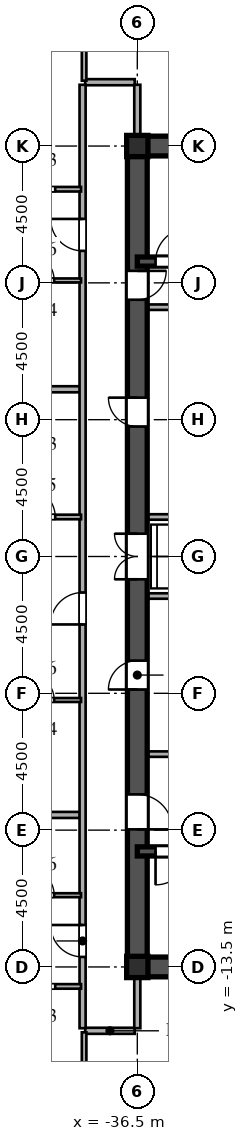
"""IFC4 building model, lengths in metres.
Left out: names, types, materials, properties, quantities, classifications, styles, units other than length and angle.
Written with IfcOpenShell. Run it as: python <this file> out.ifc"""

import sys

from ifc_helpers import new_model, si_unit, direction, frame, frame_2d, origin, origin_2d, place, context, subcontext, project, spatial, rectangle, i_section, extrude, source, transform, mapped, element, fill, save


model = new_model("IFC4")
c1 = context("Model", 3, precision=1e-05, world=origin(), true_north=direction((0.0, 1.0)))
c2 = subcontext(c1, "Body", "Model", "MODEL_VIEW")
j1 = project(units=[si_unit("LENGTHUNIT", "METRE"), si_unit("PLANEANGLEUNIT", "RADIAN")], contexts=[c1])
p1 = place(None, origin())
s1 = spatial("IfcSite", under=j1, at=p1, CompositionType="ELEMENT")
p2 = place(p1, origin())
s2 = spatial("IfcBuilding", under=s1, at=p2, CompositionType="ELEMENT")
p3 = place(p2, frame((0.0, 0.0, 110.4)))
s3 = spatial("IfcBuildingStorey", under=s2, at=p3, CompositionType="ELEMENT", Elevation=110.4)
m1 = source(origin(), c2, "Body", "SweptSolid", [
    extrude(i_section(OverallWidth=0.7, OverallDepth=0.7, WebThickness=0.028, FlangeThickness=0.045, at=origin_2d()), origin(), (0.0, 0.0, 1.0), 3.6),
])
for number, where, z_axis, x_axis in (
    (1, (-36.5, -13.5, 0.0), (0.0, 0.0, 1.0), (1.0, 0.0, 0.0)),
    (2, (-36.5, 13.5, 0.0), (0.0, 0.0, 1.0), (1.0, 0.0, 0.0)),
):
    element("IfcColumn", number, at=place(p3, frame(where, z_axis=z_axis, x_axis=x_axis)), inside=s3, PredefinedType="COLUMN", context=c2, shape_type="MappedRepresentation", body=[
        mapped(m1, transform((0.0, 0.0, 0.0), scale=1.0)),
    ])
for number, where, z_axis, x_axis in (
    (3, (-36.5, -13.5, 0.0), (0.0, 0.0, 1.0), (1.0, 0.0, 0.0)),
    (4, (-36.5, 13.5, 0.0), (0.0, 0.0, 1.0), (1.0, 0.0, 0.0)),
):
    element("IfcWall", number, at=place(p3, frame(where, z_axis=z_axis, x_axis=x_axis)), inside=s3, PredefinedType="SHEAR", context=c2, shape_type="SweptSolid", body=[
        extrude(rectangle(XDim=9.0, YDim=0.65, at=frame_2d((4.5, 0.0))), origin(), (0.0, 0.0, 1.0), 3.38),
    ])
p4 = place(p3, frame((-36.5, -13.65, 0.0), z_axis=(0.0, 0.0, 1.0), x_axis=(0.0, 1.0, 0.0)))
e5 = element("IfcWall", 5, at=p4, inside=s3, PredefinedType="SHEAR", context=c2, shape_type="SweptSolid", body=[
    extrude(rectangle(XDim=7.15, YDim=0.65, at=frame_2d((3.575, 0.0))), origin(), (0.0, 0.0, 1.0), 3.38),
])
p5 = place(p4, frame((4.675, 0.0, 0.0)))
e6 = element("IfcOpeningElement", 6, at=p5, cuts=e5, PredefinedType="OPENING", context=c2, shape_type="SweptSolid", body=[
    extrude(rectangle(XDim=1.15, YDim=2.2, at=frame_2d((0.575, 1.1))), frame((0.0, 0.335, 0.0), z_axis=(0.0, -1.0, 0.0), x_axis=(1.0, 0.0, 0.0)), (0.0, 0.0, 1.0), 0.67),
])
p6 = place(p3, frame((-36.5, -1.3, 0.0), z_axis=(0.0, 0.0, 1.0), x_axis=(0.0, 1.0, 0.0)))
e7 = element("IfcWall", 7, at=p6, inside=s3, PredefinedType="SHEAR", context=c2, shape_type="SweptSolid", body=[
    extrude(rectangle(XDim=2.6, YDim=0.65, at=frame_2d((1.3, 0.0))), origin(), (0.0, 0.0, 1.0), 3.38),
])
p7 = place(p6, frame((0.55, 0.0, 0.0)))
e8 = element("IfcOpeningElement", 8, at=p7, cuts=e7, PredefinedType="OPENING", context=c2, shape_type="SweptSolid", body=[
    extrude(rectangle(XDim=1.5, YDim=2.3, at=frame_2d((0.75, 1.15))), frame((0.0, 0.335, 0.0), z_axis=(0.0, -1.0, 0.0), x_axis=(1.0, 0.0, 0.0)), (0.0, 0.0, 1.0), 0.67),
])
p8 = place(p3, frame((-36.5, 8.2, 0.0), z_axis=(0.0, 0.0, 1.0), x_axis=(0.0, 1.0, 0.0)))
e9 = element("IfcWall", 9, at=p8, inside=s3, PredefinedType="SHEAR", context=c2, shape_type="SweptSolid", body=[
    extrude(rectangle(XDim=5.45, YDim=0.65, at=frame_2d((2.725, 0.0))), origin(), (0.0, 0.0, 1.0), 3.38),
])
p9 = place(p8, frame((0.245, 0.0, 0.0)))
e10 = element("IfcOpeningElement", 10, at=p9, cuts=e9, PredefinedType="OPENING", context=c2, shape_type="SweptSolid", body=[
    extrude(rectangle(XDim=0.95, YDim=2.15, at=frame_2d((0.475, 1.075))), frame((0.0, 0.335, 0.0), z_axis=(0.0, -1.0, 0.0), x_axis=(1.0, 0.0, 0.0)), (0.0, 0.0, 1.0), 0.67),
])
p10 = place(p3, frame((-36.5, -6.5, 0.0), z_axis=(0.0, 0.0, 1.0), x_axis=(0.0, 1.0, 0.0)))
e11 = element("IfcWall", 11, at=p10, inside=s3, PredefinedType="SHEAR", context=c2, shape_type="SweptSolid", body=[
    extrude(rectangle(XDim=5.2, YDim=0.65, at=frame_2d((2.6, 0.0))), origin(), (0.0, 0.0, 1.0), 3.38),
])
p11 = place(p10, frame((2.125, 0.0, 0.0)))
e12 = element("IfcOpeningElement", 12, at=p11, cuts=e11, PredefinedType="OPENING", context=c2, shape_type="SweptSolid", body=[
    extrude(rectangle(XDim=0.95, YDim=2.15, at=frame_2d((0.475, 1.075))), frame((0.0, 0.335, 0.0), z_axis=(0.0, -1.0, 0.0), x_axis=(1.0, 0.0, 0.0)), (0.0, 0.0, 1.0), 0.67),
])
p12 = place(p3, frame((-36.5, 1.3, 0.0), z_axis=(0.0, 0.0, 1.0), x_axis=(0.0, 1.0, 0.0)))
e13 = element("IfcWall", 13, at=p12, inside=s3, PredefinedType="SHEAR", context=c2, shape_type="SweptSolid", body=[
    extrude(rectangle(XDim=6.9, YDim=0.65, at=frame_2d((3.45, 0.0))), origin(), (0.0, 0.0, 1.0), 3.38),
])
p13 = place(p12, frame((2.975, 0.0, 0.0)))
e14 = element("IfcOpeningElement", 14, at=p13, cuts=e13, PredefinedType="OPENING", context=c2, shape_type="SweptSolid", body=[
    extrude(rectangle(XDim=0.95, YDim=2.15, at=frame_2d((0.475, 1.075))), frame((0.0, 0.335, 0.0), z_axis=(0.0, -1.0, 0.0), x_axis=(1.0, 0.0, 0.0)), (0.0, 0.0, 1.0), 0.67),
])
p14 = place(p3, frame((-36.5, -9.7, 0.0), z_axis=(0.0, 0.0, 1.0), x_axis=(1.0, 0.0, 0.0)))
e15 = element("IfcWall", 15, at=p14, inside=s3, PredefinedType="SHEAR", context=c2, shape_type="SweptSolid", body=[
    extrude(rectangle(XDim=9.0, YDim=0.3, at=frame_2d((4.5, 0.0))), origin(), (0.0, 0.0, 1.0), 3.38),
])
p15 = place(p14, frame((0.6, 0.0, 0.0)))
e16 = element("IfcOpeningElement", 16, at=p15, cuts=e15, PredefinedType="OPENING", context=c2, shape_type="SweptSolid", body=[
    extrude(rectangle(XDim=1.1, YDim=2.2, at=frame_2d((0.55, 1.1))), frame((0.0, 0.16, 0.0), z_axis=(0.0, -1.0, 0.0), x_axis=(1.0, 0.0, 0.0)), (0.0, 0.0, 1.0), 0.32),
])
p16 = place(p3, frame((-36.5, 9.7, 0.0), z_axis=(0.0, 0.0, 1.0), x_axis=(1.0, 0.0, 0.0)))
e17 = element("IfcWall", 17, at=p16, inside=s3, PredefinedType="SHEAR", context=c2, shape_type="SweptSolid", body=[
    extrude(rectangle(XDim=9.0, YDim=0.3, at=frame_2d((4.5, 0.0))), origin(), (0.0, 0.0, 1.0), 3.38),
])
p17 = place(p16, frame((0.6, 0.0, 0.0)))
e18 = element("IfcOpeningElement", 18, at=p17, cuts=e17, PredefinedType="OPENING", context=c2, shape_type="SweptSolid", body=[
    extrude(rectangle(XDim=1.1, YDim=2.2, at=frame_2d((0.55, 1.1))), frame((0.0, 0.16, 0.0), z_axis=(0.0, -1.0, 0.0), x_axis=(1.0, 0.0, 0.0)), (0.0, 0.0, 1.0), 0.32),
])
for number, where, z_axis, x_axis in (
    (19, (-36.15, -6.5, 0.0), (0.0, 0.0, 1.0), (1.0, 0.0, 0.0)),
    (20, (-36.15, 8.2, 0.0), (0.0, 0.0, 1.0), (1.0, 0.0, 0.0)),
):
    element("IfcWall", number, at=place(p3, frame(where, z_axis=z_axis, x_axis=x_axis)), inside=s3, PredefinedType="PARTITIONING", context=c2, shape_type="SweptSolid", body=[
        extrude(rectangle(XDim=5.7, YDim=0.18, at=frame_2d((2.85, 0.0))), origin(), (0.0, 0.0, 1.0), 3.38),
    ])
for number, where, z_axis, x_axis in (
    (21, (-36.15, -1.3, 0.0), (0.0, 0.0, 1.0), (1.0, 0.0, 0.0)),
    (22, (-36.15, 1.3, 0.0), (0.0, 0.0, 1.0), (1.0, 0.0, 0.0)),
):
    element("IfcWall", number, at=place(p3, frame(where, z_axis=z_axis, x_axis=x_axis)), inside=s3, PredefinedType="PARTITIONING", context=c2, shape_type="SweptSolid", body=[
        extrude(rectangle(XDim=2.95, YDim=0.18, at=frame_2d((1.475, 0.0))), origin(), (0.0, 0.0, 1.0), 3.38),
    ])
p18 = place(p3, frame((-38.215, -15.6, 0.0), z_axis=(0.0, 0.0, 1.0), x_axis=(1.0, 0.0, 0.0)))
e23 = element("IfcWall", 23, at=p18, inside=s3, PredefinedType="PARTITIONING", context=c2, shape_type="SweptSolid", body=[
    extrude(rectangle(XDim=1.63, YDim=0.2, at=frame_2d((0.815, 0.0))), origin(), (0.0, 0.0, 1.0), 3.38),
])
p19 = place(p3, frame((-41.0, -14.14, 0.0), z_axis=(0.0, 0.0, 1.0), x_axis=(1.0, 0.0, 0.0)))
e24 = element("IfcWall", 24, at=p19, inside=s3, PredefinedType="PARTITIONING", context=c2, shape_type="SweptSolid", body=[
    extrude(rectangle(XDim=2.65, YDim=0.15, at=frame_2d((1.325, 0.0))), origin(), (0.0, 0.0, 1.0), 3.38),
])
p20 = place(p19, frame((0.85, 0.0, 0.0)))
e25 = element("IfcOpeningElement", 25, at=p20, cuts=e24, PredefinedType="OPENING", context=c2, shape_type="SweptSolid", body=[
    extrude(rectangle(XDim=0.95, YDim=2.15, at=frame_2d((0.475, 1.075))), frame((0.0, 0.085, 0.0), z_axis=(0.0, -1.0, 0.0), x_axis=(1.0, 0.0, 0.0)), (0.0, 0.0, 1.0), 0.17),
])
p21 = place(p3, frame((-41.0, -11.14, 0.0), z_axis=(0.0, 0.0, 1.0), x_axis=(1.0, 0.0, 0.0)))
e26 = element("IfcWall", 26, at=p21, inside=s3, PredefinedType="PARTITIONING", context=c2, shape_type="SweptSolid", body=[
    extrude(rectangle(XDim=2.65, YDim=0.13, at=frame_2d((1.325, 0.0))), origin(), (0.0, 0.0, 1.0), 3.38),
])
p22 = place(p21, frame((0.885, 0.0, 0.0)))
e27 = element("IfcOpeningElement", 27, at=p22, cuts=e26, PredefinedType="OPENING", context=c2, shape_type="SweptSolid", body=[
    extrude(rectangle(XDim=0.88, YDim=2.1, at=frame_2d((0.44, 1.05))), frame((0.0, 0.075, 0.0), z_axis=(0.0, -1.0, 0.0), x_axis=(1.0, 0.0, 0.0)), (0.0, 0.0, 1.0), 0.15),
])
p23 = place(p3, frame((-62.69, -8.5, 0.0), z_axis=(0.0, 0.0, 1.0), x_axis=(1.0, 0.0, 0.0)))
e28 = element("IfcWall", 28, at=p23, inside=s3, PredefinedType="PARTITIONING", context=c2, shape_type="SweptSolid", body=[
    extrude(rectangle(XDim=24.31, YDim=0.2, at=frame_2d((12.155, 0.0))), origin(), (0.0, 0.0, 1.0), 3.38),
])
p24 = place(p3, frame((-41.0, -4.72, 0.0), z_axis=(0.0, 0.0, 1.0), x_axis=(1.0, 0.0, 0.0)))
e29 = element("IfcWall", 29, at=p24, inside=s3, PredefinedType="PARTITIONING", context=c2, shape_type="SweptSolid", body=[
    extrude(rectangle(XDim=2.65, YDim=0.13, at=frame_2d((1.325, 0.0))), origin(), (0.0, 0.0, 1.0), 3.38),
])
p25 = place(p24, frame((0.885, 0.0, 0.0)))
e30 = element("IfcOpeningElement", 30, at=p25, cuts=e29, PredefinedType="OPENING", context=c2, shape_type="SweptSolid", body=[
    extrude(rectangle(XDim=0.88, YDim=2.1, at=frame_2d((0.44, 1.05))), frame((0.0, 0.075, 0.0), z_axis=(0.0, -1.0, 0.0), x_axis=(1.0, 0.0, 0.0)), (0.0, 0.0, 1.0), 0.15),
])
p26 = place(p3, frame((-41.0, 1.3, 0.0), z_axis=(0.0, 0.0, 1.0), x_axis=(1.0, 0.0, 0.0)))
e31 = element("IfcWall", 31, at=p26, inside=s3, PredefinedType="PARTITIONING", context=c2, shape_type="SweptSolid", body=[
    extrude(rectangle(XDim=2.65, YDim=0.15, at=frame_2d((1.325, 0.0))), origin(), (0.0, 0.0, 1.0), 3.38),
])
p27 = place(p26, frame((0.85, 0.0, 0.0)))
e32 = element("IfcOpeningElement", 32, at=p27, cuts=e31, PredefinedType="OPENING", context=c2, shape_type="SweptSolid", body=[
    extrude(rectangle(XDim=0.95, YDim=2.15, at=frame_2d((0.475, 1.075))), frame((0.0, 0.085, 0.0), z_axis=(0.0, -1.0, 0.0), x_axis=(1.0, 0.0, 0.0)), (0.0, 0.0, 1.0), 0.17),
])
p28 = place(p3, frame((-68.458, 5.5, 0.0), z_axis=(0.0, 0.0, 1.0), x_axis=(1.0, 0.0, 0.0)))
e33 = element("IfcWall", 33, at=p28, inside=s3, PredefinedType="PARTITIONING", context=c2, shape_type="SweptSolid", body=[
    extrude(rectangle(XDim=30.079, YDim=0.2, at=frame_2d((15.039, 0.0))), origin(), (0.0, 0.0, 1.0), 3.38),
])
p29 = place(p3, frame((-41.0, 9.08, 0.0), z_axis=(0.0, 0.0, 1.0), x_axis=(1.0, 0.0, 0.0)))
e34 = element("IfcWall", 34, at=p29, inside=s3, PredefinedType="PARTITIONING", context=c2, shape_type="SweptSolid", body=[
    extrude(rectangle(XDim=2.65, YDim=0.13, at=frame_2d((1.325, 0.0))), origin(), (0.0, 0.0, 1.0), 3.38),
])
p30 = place(p29, frame((0.885, 0.0, 0.0)))
e35 = element("IfcOpeningElement", 35, at=p30, cuts=e34, PredefinedType="OPENING", context=c2, shape_type="SweptSolid", body=[
    extrude(rectangle(XDim=0.88, YDim=2.1, at=frame_2d((0.44, 1.05))), frame((0.0, 0.075, 0.0), z_axis=(0.0, -1.0, 0.0), x_axis=(1.0, 0.0, 0.0)), (0.0, 0.0, 1.0), 0.15),
])
p31 = place(p3, frame((-41.0, 12.08, 0.0), z_axis=(0.0, 0.0, 1.0), x_axis=(1.0, 0.0, 0.0)))
e36 = element("IfcWall", 36, at=p31, inside=s3, PredefinedType="PARTITIONING", context=c2, shape_type="SweptSolid", body=[
    extrude(rectangle(XDim=2.65, YDim=0.15, at=frame_2d((1.325, 0.0))), origin(), (0.0, 0.0, 1.0), 3.38),
])
p32 = place(p31, frame((0.85, 0.0, 0.0)))
e37 = element("IfcOpeningElement", 37, at=p32, cuts=e36, PredefinedType="OPENING", context=c2, shape_type="SweptSolid", body=[
    extrude(rectangle(XDim=0.95, YDim=2.15, at=frame_2d((0.475, 1.075))), frame((0.0, 0.085, 0.0), z_axis=(0.0, -1.0, 0.0), x_axis=(1.0, 0.0, 0.0)), (0.0, 0.0, 1.0), 0.17),
])
p33 = place(p3, frame((-38.215, 15.6, 0.0), z_axis=(0.0, 0.0, 1.0), x_axis=(1.0, 0.0, 0.0)))
e38 = element("IfcWall", 38, at=p33, inside=s3, PredefinedType="PARTITIONING", context=c2, shape_type="SweptSolid", body=[
    extrude(rectangle(XDim=1.63, YDim=0.2, at=frame_2d((0.815, 0.0))), origin(), (0.0, 0.0, 1.0), 3.38),
])
p34 = place(p3, frame((-38.3, -15.515, 0.0), z_axis=(0.0, 0.0, 1.0), x_axis=(0.0, 1.0, 0.0)))
e39 = element("IfcWall", 39, at=p34, inside=s3, PredefinedType="PARTITIONING", context=c2, shape_type="SweptSolid", body=[
    extrude(rectangle(XDim=31.03, YDim=0.2, at=frame_2d((15.515, 0.0))), origin(), (0.0, 0.0, 1.0), 3.38),
])
p35 = place(p34, frame((2.345, 0.0, 0.0)))
e40 = element("IfcOpeningElement", 40, at=p35, cuts=e39, PredefinedType="OPENING", context=c2, shape_type="SweptSolid", body=[
    extrude(rectangle(XDim=1.05, YDim=2.25, at=frame_2d((0.525, 1.125))), frame((0.0, 0.11, 0.0), z_axis=(0.0, -1.0, 0.0), x_axis=(1.0, 0.0, 0.0)), (0.0, 0.0, 1.0), 0.22),
])
p36 = place(p34, frame((13.28, 0.0, 0.0)))
e41 = element("IfcOpeningElement", 41, at=p36, cuts=e39, PredefinedType="OPENING", context=c2, shape_type="SweptSolid", body=[
    extrude(rectangle(XDim=1.05, YDim=2.25, at=frame_2d((0.525, 1.125))), frame((0.0, 0.11, 0.0), z_axis=(0.0, -1.0, 0.0), x_axis=(1.0, 0.0, 0.0)), (0.0, 0.0, 1.0), 0.22),
])
p37 = place(p34, frame((25.567, 0.0, 0.0)))
e42 = element("IfcOpeningElement", 42, at=p37, cuts=e39, PredefinedType="OPENING", context=c2, shape_type="SweptSolid", body=[
    extrude(rectangle(XDim=1.05, YDim=2.25, at=frame_2d((0.525, 1.125))), frame((0.0, 0.11, 0.0), z_axis=(0.0, -1.0, 0.0), x_axis=(1.0, 0.0, 0.0)), (0.0, 0.0, 1.0), 0.22),
])
p38 = place(p3, frame((-38.25, -21.071, 0.0), z_axis=(0.0, 0.0, 1.0), x_axis=(0.0, 1.0, 0.0)))
e43 = element("IfcWall", 43, at=p38, inside=s3, PredefinedType="PARTITIONING", context=c2, shape_type="SweptSolid", body=[
    extrude(rectangle(XDim=5.421, YDim=0.15, at=frame_2d((2.71, 0.0))), origin(), (0.0, 0.0, 1.0), 3.38),
])
p39 = place(p38, frame((0.578, 0.0, 0.0)))
e44 = element("IfcOpeningElement", 44, at=p39, cuts=e43, PredefinedType="OPENING", context=c2, shape_type="SweptSolid", body=[
    extrude(rectangle(XDim=0.95, YDim=2.15, at=frame_2d((0.475, 1.075))), frame((0.0, 0.085, 0.0), z_axis=(0.0, -1.0, 0.0), x_axis=(1.0, 0.0, 0.0)), (0.0, 0.0, 1.0), 0.17),
])
p40 = place(p3, frame((-38.25, 15.65, 0.0), z_axis=(0.0, 0.0, 1.0), x_axis=(0.0, 1.0, 0.0)))
e45 = element("IfcWall", 45, at=p40, inside=s3, PredefinedType="PARTITIONING", context=c2, shape_type="SweptSolid", body=[
    extrude(rectangle(XDim=5.421, YDim=0.15, at=frame_2d((2.71, 0.0))), origin(), (0.0, 0.0, 1.0), 3.38),
])
p41 = place(p40, frame((1.175, 0.0, 0.0)))
e46 = element("IfcOpeningElement", 46, at=p41, cuts=e45, PredefinedType="OPENING", context=c2, shape_type="SweptSolid", body=[
    extrude(rectangle(XDim=0.95, YDim=2.15, at=frame_2d((0.475, 1.075))), frame((0.0, 0.085, 0.0), z_axis=(0.0, -1.0, 0.0), x_axis=(1.0, 0.0, 0.0)), (0.0, 0.0, 1.0), 0.17),
])
for number, where, z_axis, x_axis in (
    (47, (-36.5, -15.515, 0.0), (0.0, 0.0, 1.0), (0.0, 1.0, 0.0)),
    (48, (-36.5, 13.83, 0.0), (0.0, 0.0, 1.0), (0.0, 1.0, 0.0)),
):
    element("IfcWall", number, at=place(p3, frame(where, z_axis=z_axis, x_axis=x_axis)), inside=s3, PredefinedType="PARTITIONING", context=c2, shape_type="SweptSolid", body=[
        extrude(rectangle(XDim=1.685, YDim=0.2, at=frame_2d((0.842, 0.0))), origin(), (0.0, 0.0, 1.0), 2.78),
    ])
m2 = source(origin(), c2, "Body", "SweptSolid", [
    extrude(rectangle(XDim=1.15, YDim=2.2, at=frame_2d((0.575, 1.1))), frame((0.0, 0.025, 0.0), z_axis=(0.0, -1.0, 0.0), x_axis=(1.0, 0.0, 0.0)), (0.0, 0.0, 1.0), 0.05),
])
p42 = place(p5, frame((1.15, 0.0, 0.0), z_axis=(0.0, 0.0, 1.0), x_axis=(-1.0, 0.0, 0.0)))
e49 = element("IfcDoor", 49, at=p42, inside=s3, OperationType="SINGLE_SWING_LEFT", PredefinedType="DOOR", context=c2, shape_type="MappedRepresentation", body=[
    mapped(m2, transform((0.0, 0.0, 0.0), scale=1.0)),
])
fill(e6, e49)
m3 = source(origin(), c2, "Body", "SweptSolid", [
    extrude(rectangle(XDim=1.5, YDim=2.3, at=frame_2d((0.75, 1.15))), frame((0.0, 0.025, 0.0), z_axis=(0.0, -1.0, 0.0), x_axis=(1.0, 0.0, 0.0)), (0.0, 0.0, 1.0), 0.05),
])
p43 = place(p7, origin())
e50 = element("IfcDoor", 50, at=p43, inside=s3, OperationType="DOUBLE_SWING_LEFT", PredefinedType="DOOR", context=c2, shape_type="MappedRepresentation", body=[
    mapped(m3, transform((0.0, 0.0, 0.0), scale=1.0)),
])
fill(e8, e50)
m4 = source(origin(), c2, "Body", "SweptSolid", [
    extrude(rectangle(XDim=0.95, YDim=2.15, at=frame_2d((0.475, 1.075))), frame((0.0, 0.025, 0.0), z_axis=(0.0, -1.0, 0.0), x_axis=(1.0, 0.0, 0.0)), (0.0, 0.0, 1.0), 0.05),
])
p44 = place(p9, frame((0.95, 0.0, 0.0), z_axis=(0.0, 0.0, 1.0), x_axis=(-1.0, 0.0, 0.0)))
e51 = element("IfcDoor", 51, at=p44, inside=s3, OperationType="SINGLE_SWING_RIGHT", PredefinedType="DOOR", context=c2, shape_type="MappedRepresentation", body=[
    mapped(m4, transform((0.0, 0.0, 0.0), scale=1.0)),
])
fill(e10, e51)
p45 = place(p11, origin())
e52 = element("IfcDoor", 52, at=p45, inside=s3, OperationType="SINGLE_SWING_LEFT", PredefinedType="DOOR", context=c2, shape_type="MappedRepresentation", body=[
    mapped(m4, transform((0.0, 0.0, 0.0), scale=1.0)),
])
fill(e12, e52)
p46 = place(p13, origin())
e53 = element("IfcDoor", 53, at=p46, inside=s3, OperationType="SINGLE_SWING_RIGHT", PredefinedType="DOOR", context=c2, shape_type="MappedRepresentation", body=[
    mapped(m4, transform((0.0, 0.0, 0.0), scale=1.0)),
])
fill(e14, e53)
m5 = source(origin(), c2, "Body", "SweptSolid", [
    extrude(rectangle(XDim=1.1, YDim=2.2, at=frame_2d((0.55, 1.1))), frame((0.0, 0.025, 0.0), z_axis=(0.0, -1.0, 0.0), x_axis=(1.0, 0.0, 0.0)), (0.0, 0.0, 1.0), 0.05),
])
p47 = place(p15, frame((1.1, 0.0, 0.0), z_axis=(0.0, 0.0, 1.0), x_axis=(-1.0, 0.0, 0.0)))
e54 = element("IfcDoor", 54, at=p47, inside=s3, OperationType="SINGLE_SWING_LEFT", PredefinedType="DOOR", context=c2, shape_type="MappedRepresentation", body=[
    mapped(m5, transform((0.0, 0.0, 0.0), scale=1.0)),
])
fill(e16, e54)
p48 = place(p17, origin())
e55 = element("IfcDoor", 55, at=p48, inside=s3, OperationType="SINGLE_SWING_RIGHT", PredefinedType="DOOR", context=c2, shape_type="MappedRepresentation", body=[
    mapped(m5, transform((0.0, 0.0, 0.0), scale=1.0)),
])
fill(e18, e55)
m6 = source(origin(), c2, "Body", "SweptSolid", [
    extrude(rectangle(XDim=0.88, YDim=2.1, at=frame_2d((0.44, 1.05))), frame((0.0, 0.025, 0.0), z_axis=(0.0, -1.0, 0.0), x_axis=(1.0, 0.0, 0.0)), (0.0, 0.0, 1.0), 0.05),
])
p49 = place(p22, origin())
e56 = element("IfcDoor", 56, at=p49, inside=s3, OperationType="SINGLE_SWING_LEFT", PredefinedType="DOOR", context=c2, shape_type="MappedRepresentation", body=[
    mapped(m6, transform((0.0, 0.0, 0.0), scale=1.0)),
])
fill(e27, e56)
p50 = place(p25, origin())
e57 = element("IfcDoor", 57, at=p50, inside=s3, OperationType="SINGLE_SWING_LEFT", PredefinedType="DOOR", context=c2, shape_type="MappedRepresentation", body=[
    mapped(m6, transform((0.0, 0.0, 0.0), scale=1.0)),
])
fill(e30, e57)
m7 = source(origin(), c2, "Body", "SweptSolid", [
    extrude(rectangle(XDim=0.95, YDim=2.15, at=frame_2d((0.475, 1.075))), frame((0.0, 0.025, 0.0), z_axis=(0.0, -1.0, 0.0), x_axis=(1.0, 0.0, 0.0)), (0.0, 0.0, 1.0), 0.05),
])
p51 = place(p27, origin())
e58 = element("IfcDoor", 58, at=p51, inside=s3, OperationType="SINGLE_SWING_LEFT", PredefinedType="DOOR", context=c2, shape_type="MappedRepresentation", body=[
    mapped(m7, transform((0.0, 0.0, 0.0), scale=1.0)),
])
fill(e32, e58)
p52 = place(p30, origin())
e59 = element("IfcDoor", 59, at=p52, inside=s3, OperationType="SINGLE_SWING_LEFT", PredefinedType="DOOR", context=c2, shape_type="MappedRepresentation", body=[
    mapped(m6, transform((0.0, 0.0, 0.0), scale=1.0)),
])
fill(e35, e59)
m8 = source(origin(), c2, "Body", "SweptSolid", [
    extrude(rectangle(XDim=1.05, YDim=2.25, at=frame_2d((0.525, 1.125))), frame((0.0, 0.025, 0.0), z_axis=(0.0, -1.0, 0.0), x_axis=(1.0, 0.0, 0.0)), (0.0, 0.0, 1.0), 0.05),
])
p53 = place(p35, origin())
e60 = element("IfcDoor", 60, at=p53, inside=s3, OperationType="SINGLE_SWING_RIGHT", PredefinedType="DOOR", context=c2, shape_type="MappedRepresentation", body=[
    mapped(m8, transform((0.0, 0.0, 0.0), scale=1.0)),
])
fill(e40, e60)
p54 = place(p36, origin())
e61 = element("IfcDoor", 61, at=p54, inside=s3, OperationType="SINGLE_SWING_LEFT", PredefinedType="DOOR", context=c2, shape_type="MappedRepresentation", body=[
    mapped(m8, transform((0.0, 0.0, 0.0), scale=1.0)),
])
fill(e41, e61)
p55 = place(p37, origin())
e62 = element("IfcDoor", 62, at=p55, inside=s3, OperationType="SINGLE_SWING_RIGHT", PredefinedType="DOOR", context=c2, shape_type="MappedRepresentation", body=[
    mapped(m8, transform((0.0, 0.0, 0.0), scale=1.0)),
])
fill(e42, e62)
save(model, sys.argv[1])
